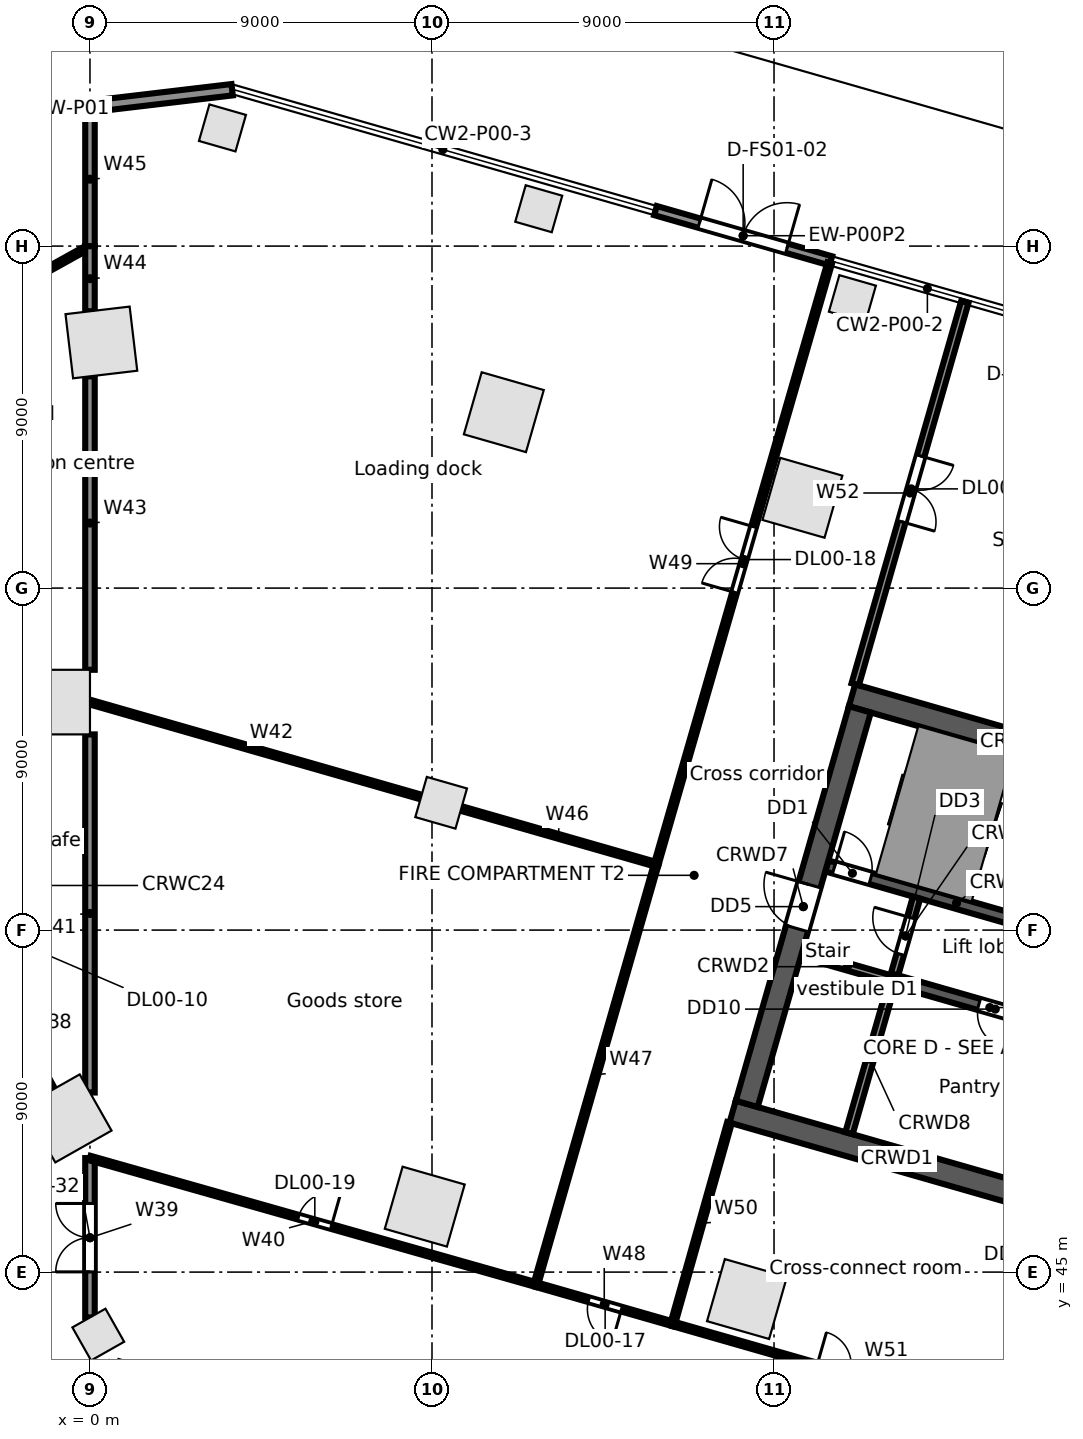
"""IFC4 building model, lengths in metres.
Left out: names, types, materials, properties, quantities, classifications, styles, units other than length and angle.
Written with IfcOpenShell. Run it as: python <this file> out.ifc"""

import sys

from ifc_helpers import new_model, si_unit, direction, frame, frame_2d, origin, origin_2d, place, context, subcontext, project, spatial, rectangle, extrude, element, fill, save


model = new_model("IFC4")
c1 = context("Model", 3, precision=1e-05, world=origin(), true_north=direction((0.0, 1.0)))
c2 = subcontext(c1, "Body", "Model", "MODEL_VIEW")
j1 = project(units=[si_unit("LENGTHUNIT", "METRE"), si_unit("PLANEANGLEUNIT", "RADIAN")], contexts=[c1])
p1 = place(None, origin())
s1 = spatial("IfcSite", under=j1, at=p1, CompositionType="ELEMENT")
p2 = place(p1, origin())
s2 = spatial("IfcBuilding", under=s1, at=p2, CompositionType="ELEMENT")
p3 = place(p2, origin())
s3 = spatial("IfcBuildingStorey", under=s2, at=p3, CompositionType="ELEMENT", Elevation=0.0)
for number, where, z_axis, x_axis in (
    (1, (18.746, 65.376, 0.0), (0.0, 0.0, 1.0), (-0.961, 0.276, 0.0)),
    (2, (10.89, 67.629, 0.0), (0.0, 0.0, 1.0), (-0.961, 0.276, 0.0)),
    (3, (0.3, 69.464, 0.0), (0.0, 0.0, 1.0), (-0.993, -0.118, 0.0)),
    (4, (-0.591, 49.044, 0.0), (0.0, 0.0, 1.0), (0.87, 0.492, 0.0)),
    (5, (8.81, 46.722, 0.0), (0.0, 0.0, 1.0), (0.961, -0.276, 0.0)),
    (6, (17.288, 44.291, 0.0), (0.0, 0.0, 1.0), (0.961, -0.276, 0.0)),
    (7, (-0.85, 60.0, 0.0), (0.0, 0.0, 1.0), (0.0, 1.0, 0.0)),
):
    element("IfcColumn", number, at=place(p3, frame(where, z_axis=z_axis, x_axis=x_axis)), inside=s3, PredefinedType="COLUMN", context=c2, shape_type="SweptSolid", body=[
        extrude(rectangle(XDim=1.7, YDim=1.7, at=origin_2d()), origin(), (0.0, 0.0, 1.0), 6.5),
    ])
for number, where, z_axis, x_axis in (
    (8, (20.062, 70.616, 0.0), (0.0, 0.0, 1.0), (-0.961, 0.276, 0.0)),
    (9, (11.809, 72.983, 0.0), (0.0, 0.0, 1.0), (-0.961, 0.276, 0.0)),
    (10, (3.486, 75.11, 0.0), (0.0, 0.0, 1.0), (-0.961, 0.276, 0.0)),
    (11, (0.219, 43.355, 0.0), (0.0, 0.0, 1.0), (0.87, 0.492, 0.0)),
):
    element("IfcColumn", number, at=place(p3, frame(where, z_axis=z_axis, x_axis=x_axis)), inside=s3, PredefinedType="COLUMN", context=c2, shape_type="SweptSolid", body=[
        extrude(rectangle(XDim=1.0, YDim=1.0, at=origin_2d()), origin(), (0.0, 0.0, 1.0), 6.5),
    ])
p4 = place(p3, frame((9.241, 57.35, 0.0), z_axis=(0.0, 0.0, 1.0), x_axis=(0.961261695938, -0.275637355817, 0.0)))
e12 = element("IfcColumn", 12, at=p4, inside=s3, PredefinedType="COLUMN", context=c2, shape_type="SweptSolid", body=[
    extrude(rectangle(XDim=1.1, YDim=1.1, at=origin_2d()), origin(), (0.0, 0.0, 1.0), 6.5),
])
p5 = place(p3, frame((-4.663, 75.12, 0.0), z_axis=(0.0, 0.0, 1.0), x_axis=(0.993069631717, 0.11752747152, 0.0)))
e13 = element("IfcWall", 13, at=p5, inside=s3, PredefinedType="STANDARD", context=c2, shape_type="SweptSolid", body=[
    extrude(rectangle(XDim=8.463, YDim=0.3, at=frame_2d((4.231, 0.0))), origin(), (0.0, 0.0, 1.0), 6.15),
])
p6 = place(p3, frame((14.881, 72.935, 0.0), z_axis=(0.0, 0.0, 1.0), x_axis=(0.961254793179, -0.275661427462, 0.0)))
e14 = element("IfcWall", 14, at=p6, inside=s3, PredefinedType="STANDARD", context=c2, shape_type="SweptSolid", body=[
    extrude(rectangle(XDim=4.8, YDim=0.25, at=frame_2d((2.4, 0.0))), origin(), (0.0, 0.0, 1.0), 6.15),
])
p7 = place(p6, frame((1.2, 0.0, 0.0)))
e15 = element("IfcOpeningElement", 15, at=p7, cuts=e14, PredefinedType="OPENING", context=c2, shape_type="SweptSolid", body=[
    extrude(rectangle(XDim=2.4, YDim=2.7, at=frame_2d((1.2, 1.35))), frame((0.0, 0.135, 0.0), z_axis=(0.0, -1.0, 0.0), x_axis=(1.0, 0.0, 0.0)), (0.0, 0.0, 1.0), 0.27),
])
p8 = place(p3, frame((16.911, 49.221, 0.0), z_axis=(0.0, 0.0, 1.0), x_axis=(0.96126248289, -0.275634611374, 0.0)))
e16 = element("IfcWall", 16, at=p8, inside=s3, PredefinedType="SOLIDWALL", context=c2, shape_type="SweptSolid", body=[
    extrude(rectangle(XDim=9.0, YDim=0.6, at=frame_2d((4.5, 0.0))), origin(), (0.0, 0.0, 1.0), 6.15),
])
p9 = place(p3, frame((18.728, 53.382, 0.0), z_axis=(0.0, 0.0, 1.0), x_axis=(0.961247070632, -0.275688355216, 0.0)))
e17 = element("IfcWall", 17, at=p9, inside=s3, PredefinedType="SOLIDWALL", context=c2, shape_type="SweptSolid", body=[
    extrude(rectangle(XDim=2.5, YDim=0.2, at=frame_2d((1.25, 0.0))), origin(), (0.0, 0.0, 1.0), 6.15),
])
p10 = place(p3, frame((21.131, 52.692, 0.0), z_axis=(0.0, 0.0, 1.0), x_axis=(0.961271492568, -0.275603188616, 0.0)))
e18 = element("IfcWall", 18, at=p10, inside=s3, PredefinedType="SOLIDWALL", context=c2, shape_type="SweptSolid", body=[
    extrude(rectangle(XDim=5.3, YDim=0.3, at=frame_2d((2.65, 0.0))), origin(), (0.0, 0.0, 1.0), 6.15),
])
p11 = place(p10, frame((2.35, 0.0, 0.0)))
e19 = element("IfcOpeningElement", 19, at=p11, cuts=e18, PredefinedType="OPENING", context=c2, shape_type="SweptSolid", body=[
    extrude(rectangle(XDim=0.9, YDim=2.1, at=frame_2d((0.45, 1.05))), frame((0.0, 0.16, 0.0), z_axis=(0.0, -1.0, 0.0), x_axis=(1.0, 0.0, 0.0)), (0.0, 0.0, 1.0), 0.32),
])
p12 = place(p3, frame((19.389, 55.689, 0.0), z_axis=(0.0, 0.0, 1.0), x_axis=(0.961261397636, -0.275638396117, 0.0)))
e20 = element("IfcWall", 20, at=p12, inside=s3, PredefinedType="SOLIDWALL", context=c2, shape_type="SweptSolid", body=[
    extrude(rectangle(XDim=7.1, YDim=0.3, at=frame_2d((3.55, 0.0))), origin(), (0.0, 0.0, 1.0), 6.15),
])
p13 = place(p12, frame((0.2, 0.0, 0.0)))
e21 = element("IfcOpeningElement", 21, at=p13, cuts=e20, PredefinedType="OPENING", context=c2, shape_type="SweptSolid", body=[
    extrude(rectangle(XDim=1.0, YDim=2.1, at=frame_2d((0.5, 1.05))), frame((0.0, 0.16, 0.0), z_axis=(0.0, -1.0, 0.0), x_axis=(1.0, 0.0, 0.0)), (0.0, 0.0, 1.0), 0.32),
])
p14 = place(p3, frame((20.053, 60.18, 0.0), z_axis=(0.0, 0.0, 1.0), x_axis=(0.96126248289, -0.275634611374, 0.0)))
e22 = element("IfcWall", 22, at=p14, inside=s3, PredefinedType="SOLIDWALL", context=c2, shape_type="SweptSolid", body=[
    extrude(rectangle(XDim=9.0, YDim=0.6, at=frame_2d((4.5, 0.0))), origin(), (0.0, 0.0, 1.0), 6.15),
])
p15 = place(p3, frame((17.282, 49.427, 0.0), z_axis=(0.0, 0.0, 1.0), x_axis=(0.275631631629, 0.961263337304, 0.0)))
e23 = element("IfcWall", 23, at=p15, inside=s3, PredefinedType="SOLIDWALL", context=c2, shape_type="SweptSolid", body=[
    extrude(rectangle(XDim=10.8, YDim=0.6, at=frame_2d((5.4, 0.0))), origin(), (0.0, 0.0, 1.0), 6.15),
])
p16 = place(p15, frame((4.8, 0.0, 0.0)))
e24 = element("IfcOpeningElement", 24, at=p16, cuts=e23, PredefinedType="OPENING", context=c2, shape_type="SweptSolid", body=[
    extrude(rectangle(XDim=1.2, YDim=2.1, at=frame_2d((0.6, 1.05))), frame((0.0, 0.31, 0.0), z_axis=(0.0, -1.0, 0.0), x_axis=(1.0, 0.0, 0.0)), (0.0, 0.0, 1.0), 0.62),
])
p17 = place(p3, frame((19.973, 48.655, 0.0), z_axis=(0.0, 0.0, 1.0), x_axis=(0.275668441653, 0.961252781674, 0.0)))
e25 = element("IfcWall", 25, at=p17, inside=s3, PredefinedType="SOLIDWALL", context=c2, shape_type="SweptSolid", body=[
    extrude(rectangle(XDim=4.05, YDim=0.2, at=frame_2d((2.025, 0.0))), origin(), (0.0, 0.0, 1.0), 6.15),
])
p18 = place(p3, frame((21.172, 52.837, 0.0), z_axis=(0.0, 0.0, 1.0), x_axis=(0.275657676022, 0.961255868981, 0.0)))
e26 = element("IfcWall", 26, at=p18, inside=s3, PredefinedType="PARTITIONING", context=c2, shape_type="SweptSolid", body=[
    extrude(rectangle(XDim=2.1, YDim=0.2, at=frame_2d((1.05, 0.0))), origin(), (0.0, 0.0, 1.0), 6.15),
])
p19 = place(p18, frame((0.55, 0.0, 0.0)))
e27 = element("IfcOpeningElement", 27, at=p19, cuts=e26, PredefinedType="OPENING", context=c2, shape_type="SweptSolid", body=[
    extrude(rectangle(XDim=1.0, YDim=2.1, at=frame_2d((0.5, 1.05))), frame((0.0, 0.11, 0.0), z_axis=(0.0, -1.0, 0.0), x_axis=(1.0, 0.0, 0.0)), (0.0, 0.0, 1.0), 0.22),
])
p20 = place(p3, frame((-6.337, 68.478, 0.0), z_axis=(0.0, 0.0, 1.0), x_axis=(0.87407148623, 0.485797320864, 0.0)))
e28 = element("IfcWall", 28, at=p20, inside=s3, PredefinedType="PARTITIONING", context=c2, shape_type="SweptSolid", body=[
    extrude(rectangle(XDim=7.25, YDim=0.125, at=frame_2d((3.625, 0.0))), origin(), (0.0, 0.0, 1.0), 5.43),
])
p21 = place(p20, frame((3.2, 0.0, 0.0)))
e29 = element("IfcOpeningElement", 29, at=p21, cuts=e28, PredefinedType="OPENING", context=c2, shape_type="SweptSolid", body=[
    extrude(rectangle(XDim=0.9, YDim=2.1, at=frame_2d((0.45, 1.05))), frame((0.0, 0.073, 0.0), z_axis=(0.0, -1.0, 0.0), x_axis=(1.0, 0.0, 0.0)), (0.0, 0.0, 1.0), 0.145),
])
p22 = place(p3, frame((-1.883, 51.467, 0.0), z_axis=(0.0, 0.0, 1.0), x_axis=(0.477162952876, -0.878814836244, 0.0)))
e30 = element("IfcWall", 30, at=p22, inside=s3, PredefinedType="PARTITIONING", context=c2, shape_type="SweptSolid", body=[
    extrude(rectangle(XDim=1.895, YDim=0.125, at=frame_2d((0.947, 0.0))), origin(), (0.0, 0.0, 1.0), 6.15),
])
p23 = place(p3, frame((0.0, 43.806, 0.0), z_axis=(0.0, 0.0, 1.0), x_axis=(0.0, 1.0, 0.0)))
e31 = element("IfcWall", 31, at=p23, inside=s3, PredefinedType="PARTITIONING", context=c2, shape_type="SweptSolid", body=[
    extrude(rectangle(XDim=4.194, YDim=0.25, at=frame_2d((2.097, 0.0))), origin(), (0.0, 0.0, 1.0), 5.212),
])
p24 = place(p23, frame((1.2, 0.0, 0.0)))
e32 = element("IfcOpeningElement", 32, at=p24, cuts=e31, PredefinedType="OPENING", context=c2, shape_type="SweptSolid", body=[
    extrude(rectangle(XDim=1.8, YDim=2.1, at=frame_2d((0.9, 1.05))), frame((0.0, 0.135, 0.0), z_axis=(0.0, -1.0, 0.0), x_axis=(1.0, 0.0, 0.0)), (0.0, 0.0, 1.0), 0.27),
])
p25 = place(p3, frame((0.0, 48.0, 0.0), z_axis=(0.0, 0.0, 1.0), x_axis=(0.962053342028, -0.27286144303, 0.0)))
e33 = element("IfcWall", 33, at=p25, inside=s3, PredefinedType="PARTITIONING", context=c2, shape_type="SweptSolid", body=[
    extrude(rectangle(XDim=12.193, YDim=0.125, at=frame_2d((6.096, 0.0))), origin(), (0.0, 0.0, 1.0), 5.53),
])
p26 = place(p25, frame((5.7, 0.0, 0.0)))
e34 = element("IfcOpeningElement", 34, at=p26, cuts=e33, PredefinedType="OPENING", context=c2, shape_type="SweptSolid", body=[
    extrude(rectangle(XDim=0.9, YDim=2.1, at=frame_2d((0.45, 1.05))), frame((0.0, 0.073, 0.0), z_axis=(0.0, -1.0, 0.0), x_axis=(1.0, 0.0, 0.0)), (0.0, 0.0, 1.0), 0.145),
])
p27 = place(p3, frame((0.0, 49.726, 0.0), z_axis=(0.0, 0.0, 1.0), x_axis=(0.0, 1.0, 0.0)))
e35 = element("IfcWall", 35, at=p27, inside=s3, PredefinedType="PARTITIONING", context=c2, shape_type="SweptSolid", body=[
    extrude(rectangle(XDim=9.424, YDim=0.25, at=frame_2d((4.712, 0.0))), origin(), (0.0, 0.0, 1.0), 6.15),
])
p28 = place(p3, frame((0.0, 60.0, 0.0), z_axis=(0.0, 0.0, 1.0), x_axis=(0.961263282922, -0.275631821288, 0.0)))
e36 = element("IfcWall", 36, at=p28, inside=s3, PredefinedType="PARTITIONING", context=c2, shape_type="SweptSolid", body=[
    extrude(rectangle(XDim=9.063, YDim=0.125, at=frame_2d((4.531, 0.0))), origin(), (0.0, 0.0, 1.0), 5.212),
])
p29 = place(p3, frame((0.0, 60.85, 0.0), z_axis=(0.0, 0.0, 1.0), x_axis=(0.0, 1.0, 0.0)))
e37 = element("IfcWall", 37, at=p29, inside=s3, PredefinedType="PARTITIONING", context=c2, shape_type="SweptSolid", body=[
    extrude(rectangle(XDim=7.723, YDim=0.25, at=frame_2d((3.861, 0.0))), origin(), (0.0, 0.0, 1.0), 5.43),
])
p30 = place(p3, frame((0.0, 70.285, 0.0), z_axis=(0.0, 0.0, 1.0), x_axis=(0.0, 1.0, 0.0)))
e38 = element("IfcWall", 38, at=p30, inside=s3, PredefinedType="PARTITIONING", context=c2, shape_type="SweptSolid", body=[
    extrude(rectangle(XDim=1.715, YDim=0.25, at=frame_2d((0.857, 0.0))), origin(), (0.0, 0.0, 1.0), 6.15),
])
p31 = place(p3, frame((0.0, 72.0, 0.0), z_axis=(0.0, 0.0, 1.0), x_axis=(0.0, 1.0, 0.0)))
e39 = element("IfcWall", 39, at=p31, inside=s3, PredefinedType="PARTITIONING", context=c2, shape_type="SweptSolid", body=[
    extrude(rectangle(XDim=3.521, YDim=0.25, at=frame_2d((1.76, 0.0))), origin(), (0.0, 0.0, 1.0), 5.524),
])
p32 = place(p3, frame((9.77, 57.199, 0.0), z_axis=(0.0, 0.0, 1.0), x_axis=(0.961262835898, -0.275633380273, 0.0)))
e40 = element("IfcWall", 40, at=p32, inside=s3, PredefinedType="PARTITIONING", context=c2, shape_type="SweptSolid", body=[
    extrude(rectangle(XDim=5.337, YDim=0.125, at=frame_2d((2.668, 0.0))), origin(), (0.0, 0.0, 1.0), 5.212),
])
p33 = place(p3, frame((11.73, 44.673, 0.0), z_axis=(0.0, 0.0, 1.0), x_axis=(0.275635044812, 0.961262358605, 0.0)))
e41 = element("IfcWall", 41, at=p33, inside=s3, PredefinedType="PARTITIONING", context=c2, shape_type="SweptSolid", body=[
    extrude(rectangle(XDim=11.5, YDim=0.125, at=frame_2d((5.75, 0.0))), origin(), (0.0, 0.0, 1.0), 5.212),
])
p34 = place(p3, frame((11.73, 44.673, 0.0), z_axis=(0.0, 0.0, 1.0), x_axis=(0.961228613303, -0.275752702557, 0.0)))
e42 = element("IfcWall", 42, at=p34, inside=s3, PredefinedType="PARTITIONING", context=c2, shape_type="SweptSolid", body=[
    extrude(rectangle(XDim=3.75, YDim=0.125, at=frame_2d((1.875, 0.0))), origin(), (0.0, 0.0, 1.0), 6.15),
])
p35 = place(p34, frame((1.45, 0.0, 0.0)))
e43 = element("IfcOpeningElement", 43, at=p35, cuts=e42, PredefinedType="OPENING", context=c2, shape_type="SweptSolid", body=[
    extrude(rectangle(XDim=0.9, YDim=2.1, at=frame_2d((0.45, 1.05))), frame((0.0, 0.073, 0.0), z_axis=(0.0, -1.0, 0.0), x_axis=(1.0, 0.0, 0.0)), (0.0, 0.0, 1.0), 0.145),
])
p36 = place(p3, frame((14.9, 55.728, 0.0), z_axis=(0.0, 0.0, 1.0), x_axis=(0.277168807321, 0.960821238446, 0.0)))
e44 = element("IfcWall", 44, at=p36, inside=s3, PredefinedType="PARTITIONING", context=c2, shape_type="SweptSolid", body=[
    extrude(rectangle(XDim=16.474, YDim=0.125, at=frame_2d((8.237, 0.0))), origin(), (0.0, 0.0, 1.0), 5.212),
])
p37 = place(p36, frame((7.45, 0.0, 0.0)))
e45 = element("IfcOpeningElement", 45, at=p37, cuts=e44, PredefinedType="OPENING", context=c2, shape_type="SweptSolid", body=[
    extrude(rectangle(XDim=1.8, YDim=2.1, at=frame_2d((0.9, 1.05))), frame((0.0, 0.073, 0.0), z_axis=(0.0, -1.0, 0.0), x_axis=(1.0, 0.0, 0.0)), (0.0, 0.0, 1.0), 0.145),
])
p38 = place(p3, frame((15.335, 43.639, 0.0), z_axis=(0.0, 0.0, 1.0), x_axis=(0.271407455373, 0.962464541252, 0.0)))
e46 = element("IfcWall", 46, at=p38, inside=s3, PredefinedType="PARTITIONING", context=c2, shape_type="SweptSolid", body=[
    extrude(rectangle(XDim=5.501, YDim=0.125, at=frame_2d((2.75, 0.0))), origin(), (0.0, 0.0, 1.0), 5.43),
])
p39 = place(p3, frame((15.335, 43.639, 0.0), z_axis=(0.0, 0.0, 1.0), x_axis=(0.961281982754, -0.275566597455, 0.0)))
e47 = element("IfcWall", 47, at=p39, inside=s3, PredefinedType="PARTITIONING", context=c2, shape_type="SweptSolid", body=[
    extrude(rectangle(XDim=9.0, YDim=0.125, at=frame_2d((4.5, 0.0))), origin(), (0.0, 0.0, 1.0), 5.322),
])
p40 = place(p39, frame((3.95, 0.0, 0.0)))
e48 = element("IfcOpeningElement", 48, at=p40, cuts=e47, PredefinedType="OPENING", context=c2, shape_type="SweptSolid", body=[
    extrude(rectangle(XDim=0.9, YDim=2.1, at=frame_2d((0.45, 1.05))), frame((0.0, 0.073, 0.0), z_axis=(0.0, -1.0, 0.0), x_axis=(1.0, 0.0, 0.0)), (0.0, 0.0, 1.0), 0.145),
])
p41 = place(p3, frame((20.136, 60.468, 0.0), z_axis=(0.0, 0.0, 1.0), x_axis=(0.275610651454, 0.96126935289, 0.0)))
e49 = element("IfcWall", 49, at=p41, inside=s3, PredefinedType="PARTITIONING", context=c2, shape_type="SweptSolid", body=[
    extrude(rectangle(XDim=10.475, YDim=0.2, at=frame_2d((5.237, 0.0))), origin(), (0.0, 0.0, 1.0), 5.43),
])
p42 = place(p41, frame((4.45, 0.0, 0.0)))
e50 = element("IfcOpeningElement", 50, at=p42, cuts=e49, PredefinedType="OPENING", context=c2, shape_type="SweptSolid", body=[
    extrude(rectangle(XDim=1.8, YDim=2.1, at=frame_2d((0.9, 1.05))), frame((0.0, 0.11, 0.0), z_axis=(0.0, -1.0, 0.0), x_axis=(1.0, 0.0, 0.0)), (0.0, 0.0, 1.0), 0.22),
])
p43 = place(p3, frame((23.986, 41.159, 0.0), z_axis=(0.0, 0.0, 1.0), x_axis=(0.271465437068, 0.962448188983, 0.0)))
e51 = element("IfcWall", 51, at=p43, inside=s3, PredefinedType="PARTITIONING", context=c2, shape_type="SweptSolid", body=[
    extrude(rectangle(XDim=5.5, YDim=0.125, at=frame_2d((2.75, 0.0))), origin(), (0.0, 0.0, 1.0), 5.43),
])
p44 = place(p7, origin())
e52 = element("IfcDoor", 52, at=p44, inside=s3, OperationType="DOUBLE_DOOR_SINGLE_SWING", PredefinedType="DOOR", context=c2, shape_type="SweptSolid", body=[
    extrude(rectangle(XDim=2.4, YDim=2.7, at=frame_2d((1.2, 1.35))), frame((0.0, 0.025, 0.0), z_axis=(0.0, -1.0, 0.0), x_axis=(1.0, 0.0, 0.0)), (0.0, 0.0, 1.0), 0.05),
])
fill(e15, e52)
p45 = place(p13, origin())
e53 = element("IfcDoor", 53, at=p45, inside=s3, OperationType="SINGLE_SWING_LEFT", PredefinedType="DOOR", context=c2, shape_type="SweptSolid", body=[
    extrude(rectangle(XDim=1.0, YDim=2.1, at=frame_2d((0.5, 1.05))), frame((0.0, 0.025, 0.0), z_axis=(0.0, -1.0, 0.0), x_axis=(1.0, 0.0, 0.0)), (0.0, 0.0, 1.0), 0.05),
])
fill(e21, e53)
p46 = place(p19, origin())
e54 = element("IfcDoor", 54, at=p46, inside=s3, OperationType="SINGLE_SWING_RIGHT", PredefinedType="DOOR", context=c2, shape_type="SweptSolid", body=[
    extrude(rectangle(XDim=1.0, YDim=2.1, at=frame_2d((0.5, 1.05))), frame((0.0, 0.025, 0.0), z_axis=(0.0, -1.0, 0.0), x_axis=(1.0, 0.0, 0.0)), (0.0, 0.0, 1.0), 0.05),
])
fill(e27, e54)
p47 = place(p16, origin())
e55 = element("IfcDoor", 55, at=p47, inside=s3, OperationType="SINGLE_SWING_RIGHT", PredefinedType="DOOR", context=c2, shape_type="SweptSolid", body=[
    extrude(rectangle(XDim=1.2, YDim=2.1, at=frame_2d((0.6, 1.05))), frame((0.0, 0.025, 0.0), z_axis=(0.0, -1.0, 0.0), x_axis=(1.0, 0.0, 0.0)), (0.0, 0.0, 1.0), 0.05),
])
fill(e24, e55)
p48 = place(p11, frame((0.9, 0.0, 0.0), z_axis=(0.0, 0.0, 1.0), x_axis=(-1.0, 0.0, 0.0)))
e56 = element("IfcDoor", 56, at=p48, inside=s3, OperationType="SINGLE_SWING_LEFT", PredefinedType="DOOR", context=c2, shape_type="SweptSolid", body=[
    extrude(rectangle(XDim=0.9, YDim=2.1, at=frame_2d((0.45, 1.05))), frame((0.0, 0.025, 0.0), z_axis=(0.0, -1.0, 0.0), x_axis=(1.0, 0.0, 0.0)), (0.0, 0.0, 1.0), 0.05),
])
fill(e19, e56)
p49 = place(p35, frame((0.9, 0.0, 0.0), z_axis=(0.0, 0.0, 1.0), x_axis=(-1.0, 0.0, 0.0)))
e57 = element("IfcDoor", 57, at=p49, inside=s3, OperationType="SINGLE_SWING_LEFT", PredefinedType="DOOR", context=c2, shape_type="SweptSolid", body=[
    extrude(rectangle(XDim=0.9, YDim=2.1, at=frame_2d((0.45, 1.05))), frame((0.0, 0.025, 0.0), z_axis=(0.0, -1.0, 0.0), x_axis=(1.0, 0.0, 0.0)), (0.0, 0.0, 1.0), 0.05),
])
fill(e43, e57)
p50 = place(p37, origin())
e58 = element("IfcDoor", 58, at=p50, inside=s3, OperationType="DOUBLE_DOOR_SINGLE_SWING", PredefinedType="DOOR", context=c2, shape_type="SweptSolid", body=[
    extrude(rectangle(XDim=1.8, YDim=2.1, at=frame_2d((0.9, 1.05))), frame((0.0, 0.025, 0.0), z_axis=(0.0, -1.0, 0.0), x_axis=(1.0, 0.0, 0.0)), (0.0, 0.0, 1.0), 0.05),
])
fill(e45, e58)
p51 = place(p26, origin())
e59 = element("IfcDoor", 59, at=p51, inside=s3, OperationType="SINGLE_SWING_RIGHT", PredefinedType="DOOR", context=c2, shape_type="SweptSolid", body=[
    extrude(rectangle(XDim=0.9, YDim=2.1, at=frame_2d((0.45, 1.05))), frame((0.0, 0.025, 0.0), z_axis=(0.0, -1.0, 0.0), x_axis=(1.0, 0.0, 0.0)), (0.0, 0.0, 1.0), 0.05),
])
fill(e34, e59)
p52 = place(p42, frame((1.8, 0.0, 0.0), z_axis=(0.0, 0.0, 1.0), x_axis=(-1.0, 0.0, 0.0)))
e60 = element("IfcDoor", 60, at=p52, inside=s3, OperationType="DOUBLE_DOOR_SINGLE_SWING", PredefinedType="DOOR", context=c2, shape_type="SweptSolid", body=[
    extrude(rectangle(XDim=1.8, YDim=2.1, at=frame_2d((0.9, 1.05))), frame((0.0, 0.025, 0.0), z_axis=(0.0, -1.0, 0.0), x_axis=(1.0, 0.0, 0.0)), (0.0, 0.0, 1.0), 0.05),
])
fill(e50, e60)
p53 = place(p24, origin())
e61 = element("IfcDoor", 61, at=p53, inside=s3, OperationType="DOUBLE_DOOR_SINGLE_SWING", PredefinedType="DOOR", context=c2, shape_type="SweptSolid", body=[
    extrude(rectangle(XDim=1.8, YDim=2.1, at=frame_2d((0.9, 1.05))), frame((0.0, 0.025, 0.0), z_axis=(0.0, -1.0, 0.0), x_axis=(1.0, 0.0, 0.0)), (0.0, 0.0, 1.0), 0.05),
])
fill(e32, e61)
save(model, sys.argv[1])
